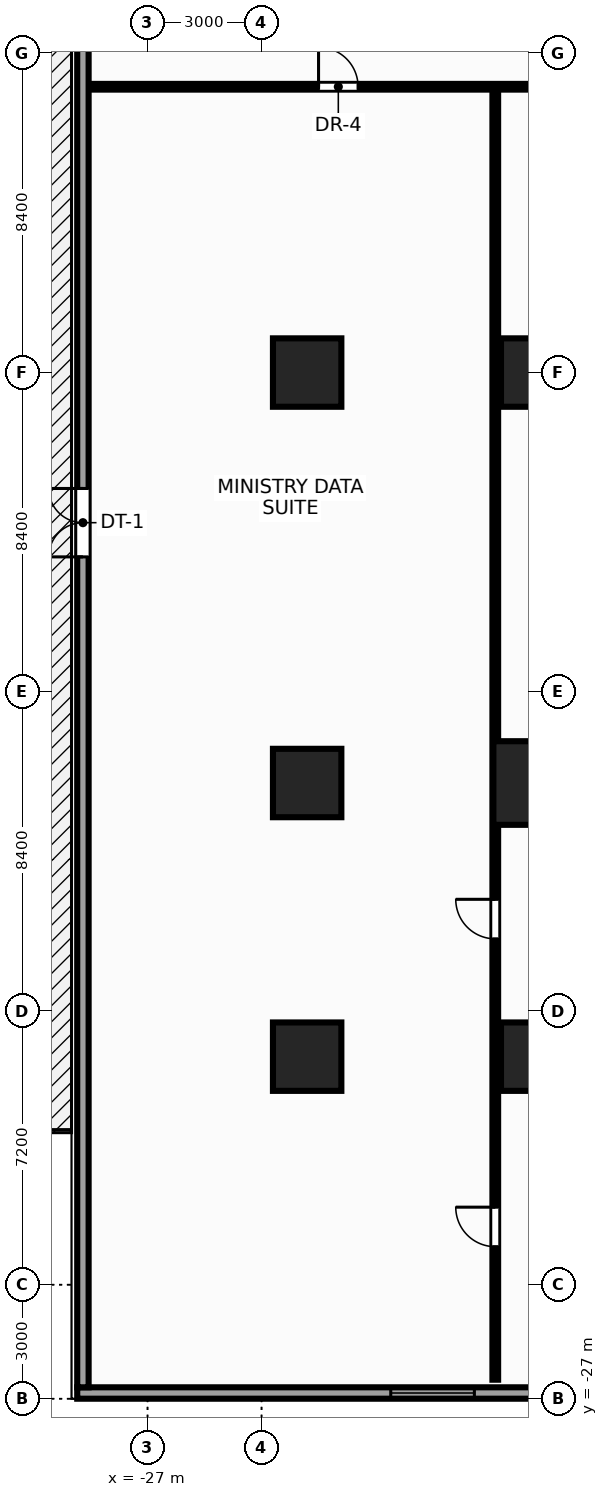
"""IFC4 building model, lengths in metres.
Left out: names, types, materials, properties, quantities, classifications, styles, units other than length and angle.
Written with IfcOpenShell. Run it as: python <this file> out.ifc"""

import sys

from ifc_helpers import new_model, si_unit, direction, frame, frame_2d, origin, origin_2d, place, context, subcontext, project, spatial, rectangle, extrude, source, transform, mapped, element, fill, save


model = new_model("IFC4")
c1 = context("Model", 3, precision=1e-05, world=origin(), true_north=direction((0.0, 1.0)))
c2 = subcontext(c1, "Body", "Model", "MODEL_VIEW")
j1 = project(units=[si_unit("LENGTHUNIT", "METRE"), si_unit("PLANEANGLEUNIT", "RADIAN")], contexts=[c1])
p1 = place(None, origin())
s1 = spatial("IfcSite", under=j1, at=p1, CompositionType="ELEMENT")
p2 = place(p1, origin())
s2 = spatial("IfcBuilding", under=s1, at=p2, CompositionType="ELEMENT")
p3 = place(p2, frame((0.0, 0.0, 18.95)))
s3 = spatial("IfcBuildingStorey", under=s2, at=p3, CompositionType="ELEMENT", Elevation=18.95)
m1 = source(origin(), c2, "Body", "SweptSolid", [
    extrude(rectangle(XDim=1.8, YDim=1.8, at=origin_2d()), origin(), (0.0, 0.0, 1.0), 4.65),
])
p4 = place(p3, frame((-16.8, -18.0, 0.0), z_axis=(0.0, 0.0, 1.0), x_axis=(1.0, 0.0, 0.0)))
e1 = element("IfcColumn", 1, at=p4, inside=s3, PredefinedType="COLUMN", context=c2, shape_type="MappedRepresentation", body=[
    mapped(m1, transform((0.0, 0.0, 0.0), x_axis=(1.0, 0.0, 0.0), y_axis=(0.0, 1.0, 0.0), z_axis=(0.0, 0.0, 1.0), scale=1.0)),
])
m2 = source(origin(), c2, "Body", "SweptSolid", [
    extrude(rectangle(XDim=2.2, YDim=2.2, at=origin_2d()), origin(), (0.0, 0.0, 1.0), 4.65),
])
p5 = place(p3, frame((-16.8, -10.8, 0.0), z_axis=(0.0, 0.0, 1.0), x_axis=(1.0, 0.0, 0.0)))
e2 = element("IfcColumn", 2, at=p5, inside=s3, PredefinedType="COLUMN", context=c2, shape_type="MappedRepresentation", body=[
    mapped(m2, transform((0.0, 0.0, 0.0), x_axis=(1.0, 0.0, 0.0), y_axis=(0.0, 1.0, 0.0), z_axis=(0.0, 0.0, 1.0), scale=1.0)),
])
for number, where, z_axis, x_axis in (
    (3, (-16.8, 0.0, 0.0), (0.0, 0.0, 1.0), (1.0, 0.0, 0.0)),
    (4, (-22.8, -18.0, 0.0), (0.0, 0.0, 1.0), (1.0, 0.0, 0.0)),
    (5, (-22.8, -10.8, 0.0), (0.0, 0.0, 1.0), (1.0, 0.0, 0.0)),
    (6, (-22.8, 0.0, 0.0), (0.0, 0.0, 1.0), (1.0, 0.0, 0.0)),
):
    element("IfcColumn", number, at=place(p3, frame(where, z_axis=z_axis, x_axis=x_axis)), inside=s3, PredefinedType="COLUMN", context=c2, shape_type="MappedRepresentation", body=[
        mapped(m1, transform((0.0, 0.0, 0.0), x_axis=(1.0, 0.0, 0.0), y_axis=(0.0, 1.0, 0.0), z_axis=(0.0, 0.0, 1.0), scale=1.0)),
    ])
m3 = source(origin(), c2, "Body", "SweptSolid", [
    extrude(rectangle(XDim=57.7, YDim=0.3, at=frame_2d((28.85, 0.0))), origin(), (0.0, 0.0, 1.0), 3.91),
])
p6 = place(p3, frame((28.85, -26.85, 0.0), z_axis=(0.0, 0.0, 1.0), x_axis=(-1.0, 0.0, 0.0)))
e7 = element("IfcWall", 7, at=p6, inside=s3, PredefinedType="STANDARD", context=c2, shape_type="MappedRepresentation", body=[
    mapped(m3, transform((0.0, 0.0, 0.0), x_axis=(1.0, 0.0, 0.0), y_axis=(0.0, 1.0, 0.0), z_axis=(0.0, 0.0, 1.0), scale=1.0)),
])
p7 = place(p6, frame((8.25, 0.0, 0.9)))
e8 = element("IfcOpeningElement", 8, at=p7, cuts=e7, PredefinedType="OPENING", context=c2, shape_type="SweptSolid", body=[
    extrude(rectangle(XDim=2.2, YDim=2.5, at=frame_2d((1.1, 1.25))), frame((0.0, 0.162, 0.0), z_axis=(0.0, -1.0, 0.0), x_axis=(1.0, 0.0, 0.0)), (0.0, 0.0, 1.0), 0.324),
])
p8 = place(p6, frame((14.75, 0.0, 0.9)))
e9 = element("IfcOpeningElement", 9, at=p8, cuts=e7, PredefinedType="OPENING", context=c2, shape_type="SweptSolid", body=[
    extrude(rectangle(XDim=2.2, YDim=2.5, at=frame_2d((1.1, 1.25))), frame((0.0, 0.162, 0.0), z_axis=(0.0, -1.0, 0.0), x_axis=(1.0, 0.0, 0.0)), (0.0, 0.0, 1.0), 0.324),
])
p9 = place(p6, frame((40.75, 0.0, 0.9)))
e10 = element("IfcOpeningElement", 10, at=p9, cuts=e7, PredefinedType="OPENING", context=c2, shape_type="SweptSolid", body=[
    extrude(rectangle(XDim=2.2, YDim=2.5, at=frame_2d((1.1, 1.25))), frame((0.0, 0.162, 0.0), z_axis=(0.0, -1.0, 0.0), x_axis=(1.0, 0.0, 0.0)), (0.0, 0.0, 1.0), 0.324),
])
p10 = place(p6, frame((47.25, 0.0, 0.9)))
e11 = element("IfcOpeningElement", 11, at=p10, cuts=e7, PredefinedType="OPENING", context=c2, shape_type="SweptSolid", body=[
    extrude(rectangle(XDim=2.2, YDim=2.5, at=frame_2d((1.1, 1.25))), frame((0.0, 0.162, 0.0), z_axis=(0.0, -1.0, 0.0), x_axis=(1.0, 0.0, 0.0)), (0.0, 0.0, 1.0), 0.324),
])
m4 = source(origin(), c2, "Body", "SweptSolid", [
    extrude(rectangle(XDim=52.29, YDim=0.3, at=frame_2d((26.145, 0.0))), origin(), (0.0, 0.0, 1.0), 3.91),
])
p11 = place(p3, frame((-28.7, -26.7, 0.0), z_axis=(0.0, 0.0, 1.0), x_axis=(0.0, 1.0, 0.0)))
e12 = element("IfcWall", 12, at=p11, inside=s3, PredefinedType="STANDARD", context=c2, shape_type="MappedRepresentation", body=[
    mapped(m4, transform((0.0, 0.0, 0.0), x_axis=(1.0, 0.0, 0.0), y_axis=(0.0, 1.0, 0.0), z_axis=(0.0, 0.0, 1.0), scale=1.0)),
])
p12 = place(p11, frame((21.85, 0.0, 0.0)))
e13 = element("IfcOpeningElement", 13, at=p12, cuts=e12, PredefinedType="OPENING", context=c2, shape_type="SweptSolid", body=[
    extrude(rectangle(XDim=1.8, YDim=2.2, at=frame_2d((0.9, 1.1))), frame((0.0, 0.162, 0.0), z_axis=(0.0, -1.0, 0.0), x_axis=(1.0, 0.0, 0.0)), (0.0, 0.0, 1.0), 0.324),
])
m5 = source(origin(), c2, "Body", "SweptSolid", [
    extrude(rectangle(XDim=57.0, YDim=0.15, at=frame_2d((28.5, 0.0))), origin(), (0.0, 0.0, 1.0), 3.795),
])
p13 = place(p3, frame((-28.5, 7.52, 0.0), z_axis=(0.0, 0.0, 1.0), x_axis=(1.0, 0.0, 0.0)))
e14 = element("IfcWall", 14, at=p13, inside=s3, PredefinedType="PARTITIONING", context=c2, shape_type="MappedRepresentation", body=[
    mapped(m5, transform((0.0, 0.0, 0.0), x_axis=(1.0, 0.0, 0.0), y_axis=(0.0, 1.0, 0.0), z_axis=(0.0, 0.0, 1.0), scale=1.0)),
])
p14 = place(p13, frame((6.0, 0.0, 0.0)))
e15 = element("IfcOpeningElement", 15, at=p14, cuts=e14, PredefinedType="OPENING", context=c2, shape_type="SweptSolid", body=[
    extrude(rectangle(XDim=1.04, YDim=2.2, at=frame_2d((0.52, 1.1))), frame((0.0, 0.087, 0.0), z_axis=(0.0, -1.0, 0.0), x_axis=(1.0, 0.0, 0.0)), (0.0, 0.0, 1.0), 0.174),
])
p15 = place(p13, frame((27.7, 0.0, 0.0)))
e16 = element("IfcOpeningElement", 16, at=p15, cuts=e14, PredefinedType="OPENING", context=c2, shape_type="SweptSolid", body=[
    extrude(rectangle(XDim=1.65, YDim=2.35, at=frame_2d((0.825, 1.175))), frame((0.0, 0.087, 0.0), z_axis=(0.0, -1.0, 0.0), x_axis=(1.0, 0.0, 0.0)), (0.0, 0.0, 1.0), 0.174),
])
p16 = place(p13, frame((49.5, 0.0, 0.0)))
e17 = element("IfcOpeningElement", 17, at=p16, cuts=e14, PredefinedType="OPENING", context=c2, shape_type="SweptSolid", body=[
    extrude(rectangle(XDim=1.04, YDim=2.2, at=frame_2d((0.52, 1.1))), frame((0.0, 0.087, 0.0), z_axis=(0.0, -1.0, 0.0), x_axis=(1.0, 0.0, 0.0)), (0.0, 0.0, 1.0), 0.174),
])
m6 = source(origin(), c2, "Body", "SweptSolid", [
    extrude(rectangle(XDim=33.88, YDim=0.15, at=frame_2d((16.94, 0.0))), origin(), (0.0, 0.0, 1.0), 3.795),
])
p17 = place(p3, frame((-17.85, -26.5, 0.0), z_axis=(0.0, 0.0, 1.0), x_axis=(0.0, 1.0, 0.0)))
e18 = element("IfcWall", 18, at=p17, inside=s3, PredefinedType="PARTITIONING", context=c2, shape_type="MappedRepresentation", body=[
    mapped(m6, transform((0.0, 0.0, 0.0), x_axis=(1.0, 0.0, 0.0), y_axis=(0.0, 1.0, 0.0), z_axis=(0.0, 0.0, 1.0), scale=1.0)),
])
p18 = place(p17, frame((11.6, 0.0, 0.0)))
e19 = element("IfcOpeningElement", 19, at=p18, cuts=e18, PredefinedType="OPENING", context=c2, shape_type="SweptSolid", body=[
    extrude(rectangle(XDim=1.04, YDim=2.2, at=frame_2d((0.52, 1.1))), frame((0.0, 0.087, 0.0), z_axis=(0.0, -1.0, 0.0), x_axis=(1.0, 0.0, 0.0)), (0.0, 0.0, 1.0), 0.174),
])
p19 = place(p17, frame((3.5, 0.0, 0.0)))
e20 = element("IfcOpeningElement", 20, at=p19, cuts=e18, PredefinedType="OPENING", context=c2, shape_type="SweptSolid", body=[
    extrude(rectangle(XDim=1.04, YDim=2.2, at=frame_2d((0.52, 1.1))), frame((0.0, 0.087, 0.0), z_axis=(0.0, -1.0, 0.0), x_axis=(1.0, 0.0, 0.0)), (0.0, 0.0, 1.0), 0.174),
])
m7 = source(origin(), c2, "Body", "SweptSolid", [
    extrude(rectangle(XDim=2.2, YDim=2.5, at=frame_2d((1.1, 1.25))), frame((0.0, 0.03, 0.0), z_axis=(0.0, -1.0, 0.0), x_axis=(1.0, 0.0, 0.0)), (0.0, 0.0, 1.0), 0.06),
])
p20 = place(p10, origin())
e21 = element("IfcWindow", 21, at=p20, inside=s3, PartitioningType="SINGLE_PANEL", PredefinedType="WINDOW", context=c2, shape_type="MappedRepresentation", body=[
    mapped(m7, transform((0.0, 0.0, 0.0), x_axis=(1.0, 0.0, 0.0), y_axis=(0.0, 1.0, 0.0), z_axis=(0.0, 0.0, 1.0), scale=1.0)),
])
fill(e11, e21)
m8 = source(origin(), c2, "Body", "SweptSolid", [
    extrude(rectangle(XDim=1.8, YDim=2.2, at=frame_2d((0.9, 1.1))), frame((0.0, 0.025, 0.0), z_axis=(0.0, -1.0, 0.0), x_axis=(1.0, 0.0, 0.0)), (0.0, 0.0, 1.0), 0.05),
])
p21 = place(p12, origin())
e22 = element("IfcDoor", 22, at=p21, inside=s3, OperationType="DOUBLE_DOOR_SINGLE_SWING", PredefinedType="DOOR", context=c2, shape_type="MappedRepresentation", body=[
    mapped(m8, transform((0.0, 0.0, 0.0), x_axis=(1.0, 0.0, 0.0), y_axis=(0.0, 1.0, 0.0), z_axis=(0.0, 0.0, 1.0), scale=1.0)),
])
fill(e13, e22)
m9 = source(origin(), c2, "Body", "SweptSolid", [
    extrude(rectangle(XDim=1.04, YDim=2.2, at=frame_2d((0.52, 1.1))), frame((0.0, 0.025, 0.0), z_axis=(0.0, -1.0, 0.0), x_axis=(1.0, 0.0, 0.0)), (0.0, 0.0, 1.0), 0.05),
])
p22 = place(p14, origin())
e23 = element("IfcDoor", 23, at=p22, inside=s3, OperationType="SINGLE_SWING_LEFT", PredefinedType="DOOR", context=c2, shape_type="MappedRepresentation", body=[
    mapped(m9, transform((0.0, 0.0, 0.0), x_axis=(1.0, 0.0, 0.0), y_axis=(0.0, 1.0, 0.0), z_axis=(0.0, 0.0, 1.0), scale=1.0)),
])
fill(e15, e23)
p23 = place(p18, origin())
e24 = element("IfcDoor", 24, at=p23, inside=s3, OperationType="SINGLE_SWING_RIGHT", PredefinedType="DOOR", context=c2, shape_type="MappedRepresentation", body=[
    mapped(m9, transform((0.0, 0.0, 0.0), x_axis=(1.0, 0.0, 0.0), y_axis=(0.0, 1.0, 0.0), z_axis=(0.0, 0.0, 1.0), scale=1.0)),
])
fill(e19, e24)
p24 = place(p19, origin())
e25 = element("IfcDoor", 25, at=p24, inside=s3, OperationType="SINGLE_SWING_RIGHT", PredefinedType="DOOR", context=c2, shape_type="MappedRepresentation", body=[
    mapped(m9, transform((0.0, 0.0, 0.0), x_axis=(1.0, 0.0, 0.0), y_axis=(0.0, 1.0, 0.0), z_axis=(0.0, 0.0, 1.0), scale=1.0)),
])
fill(e20, e25)
save(model, sys.argv[1])
